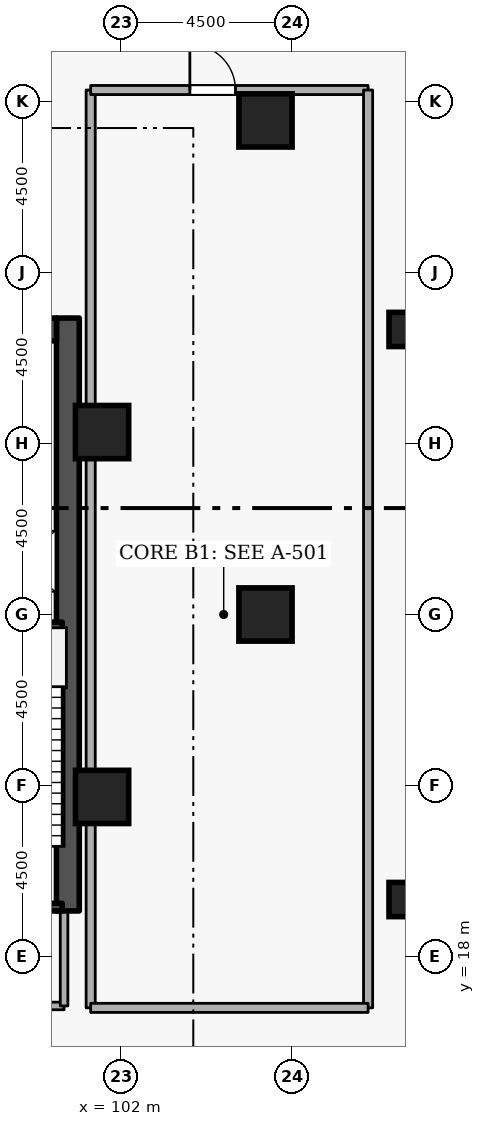
"""IFC4 building model, lengths in metres.
Left out: names, types, materials, properties, quantities, classifications, styles, units other than length and angle.
Written with IfcOpenShell. Run it as: python <this file> out.ifc"""

import sys

from ifc_helpers import new_model, si_unit, direction, frame, frame_2d, origin, origin_2d, place, context, subcontext, project, spatial, rectangle, extrude, element, fill, save


model = new_model("IFC4")
c1 = context("Model", 3, precision=1e-05, world=origin(), true_north=direction((0.0, 1.0)))
c2 = subcontext(c1, "Body", "Model", "MODEL_VIEW")
j1 = project(units=[si_unit("LENGTHUNIT", "METRE"), si_unit("PLANEANGLEUNIT", "RADIAN")], contexts=[c1])
p1 = place(None, origin())
s1 = spatial("IfcSite", under=j1, at=p1, CompositionType="ELEMENT")
p2 = place(p1, origin())
s2 = spatial("IfcBuilding", under=s1, at=p2, CompositionType="ELEMENT")
p3 = place(p2, frame((0.0, 0.0, -5.4)))
s3 = spatial("IfcBuildingStorey", under=s2, at=p3, CompositionType="ELEMENT", Elevation=-5.4)
p4 = place(p3, frame((100.6, 19.2, -0.6), z_axis=(0.0, 0.0, 1.0), x_axis=(0.0, 1.0, 0.0)))
e1 = element("IfcWall", 1, at=p4, inside=s3, PredefinedType="SHEAR", context=c2, shape_type="SweptSolid", body=[
    extrude(rectangle(XDim=15.6, YDim=0.6, at=frame_2d((7.8, 0.0))), origin(), (0.0, 0.0, 1.0), 6.0),
])
p5 = place(p3, frame((94.6, 34.5, -0.6), z_axis=(0.0, 0.0, 1.0), x_axis=(1.0, 0.0, 0.0)))
e2 = element("IfcWall", 2, at=p5, inside=s3, PredefinedType="SHEAR", context=c2, shape_type="SweptSolid", body=[
    extrude(rectangle(XDim=5.7, YDim=0.6, at=frame_2d((2.85, 0.0))), origin(), (0.0, 0.0, 1.0), 6.0),
])
for number, where, z_axis, x_axis in (
    (3, (105.8, 27.0, -0.6), (0.0, 0.0, 1.0), (1.0, 0.0, 0.0)),
    (4, (105.8, 40.0, -0.6), (0.0, 0.0, 1.0), (1.0, 0.0, 0.0)),
    (5, (101.5, 22.2, -0.6), (0.0, 0.0, 1.0), (1.0, 0.0, 0.0)),
    (6, (101.5, 31.8, -0.6), (0.0, 0.0, 1.0), (1.0, 0.0, 0.0)),
):
    element("IfcColumn", number, at=place(p3, frame(where, z_axis=z_axis, x_axis=x_axis)), inside=s3, PredefinedType="COLUMN", context=c2, shape_type="SweptSolid", body=[
        extrude(rectangle(XDim=1.4, YDim=1.4, at=origin_2d()), origin(), (0.0, 0.0, 1.0), 6.0),
    ])
for number, where, z_axis, x_axis in (
    (7, (109.5, 19.5, -0.6), (0.0, 0.0, 1.0), (1.0, 0.0, 0.0)),
    (8, (109.5, 34.5, -0.6), (0.0, 0.0, 1.0), (1.0, 0.0, 0.0)),
):
    element("IfcColumn", number, at=place(p3, frame(where, z_axis=z_axis, x_axis=x_axis)), inside=s3, PredefinedType="COLUMN", context=c2, shape_type="SweptSolid", body=[
        extrude(rectangle(XDim=0.9, YDim=0.9, at=origin_2d()), origin(), (0.0, 0.0, 1.0), 6.0),
    ])
p6 = place(p3, frame((100.45, 19.3, -0.6), z_axis=(0.0, 0.0, 1.0), x_axis=(-1.0, 0.0, 0.0)))
e9 = element("IfcWall", 9, at=p6, inside=s3, PredefinedType="SHEAR", context=c2, shape_type="SweptSolid", body=[
    extrude(rectangle(XDim=3.35, YDim=0.2, at=frame_2d((1.675, 0.0))), origin(), (0.0, 0.0, 1.0), 6.0),
])
p7 = place(p6, frame((1.125, 0.0, 0.6)))
e10 = element("IfcOpeningElement", 10, at=p7, cuts=e9, PredefinedType="OPENING", context=c2, shape_type="SweptSolid", body=[
    extrude(rectangle(XDim=1.1, YDim=2.1, at=frame_2d((0.55, 1.05))), frame((0.0, 0.11, 0.0), z_axis=(0.0, -1.0, 0.0), x_axis=(1.0, 0.0, 0.0)), (0.0, 0.0, 1.0), 0.22),
])
p8 = place(p3, frame((97.1, 26.7, -0.6), z_axis=(0.0, 0.0, 1.0), x_axis=(1.0, 0.0, 0.0)))
e11 = element("IfcWall", 11, at=p8, inside=s3, PredefinedType="SHEAR", context=c2, shape_type="SweptSolid", body=[
    extrude(rectangle(XDim=3.35, YDim=0.2, at=frame_2d((1.675, 0.0))), origin(), (0.0, 0.0, 1.0), 6.0),
])
p9 = place(p3, frame((95.35, 16.7, 0.0), z_axis=(0.0, 0.0, 1.0), x_axis=(1.0, 0.0, 0.0)))
e12 = element("IfcWall", 12, at=p9, inside=s3, PredefinedType="STANDARD", context=c2, shape_type="SweptSolid", body=[
    extrude(rectangle(XDim=5.15, YDim=0.2, at=frame_2d((2.575, 0.0))), origin(), (0.0, 0.0, 1.0), 5.06),
])
p10 = place(p9, frame((2.0, 0.0, 0.0)))
e13 = element("IfcOpeningElement", 13, at=p10, cuts=e12, PredefinedType="OPENING", context=c2, shape_type="SweptSolid", body=[
    extrude(rectangle(XDim=1.15, YDim=2.1, at=frame_2d((0.575, 1.05))), frame((0.0, 0.11, 0.0), z_axis=(0.0, -1.0, 0.0), x_axis=(1.0, 0.0, 0.0)), (0.0, 0.0, 1.0), 0.22),
])
p11 = place(p3, frame((100.5, 16.7, 0.0), z_axis=(0.0, 0.0, 1.0), x_axis=(0.0, 1.0, 0.0)))
e14 = element("IfcWall", 14, at=p11, inside=s3, PredefinedType="STANDARD", context=c2, shape_type="SweptSolid", body=[
    extrude(rectangle(XDim=2.5, YDim=0.2, at=frame_2d((1.25, 0.0))), origin(), (0.0, 0.0, 1.0), 5.06),
])
p12 = place(p3, frame((101.2, 16.65, 0.0), z_axis=(0.0, 0.0, 1.0), x_axis=(0.0, 1.0, 0.0)))
e15 = element("IfcWall", 15, at=p12, inside=s3, PredefinedType="STANDARD", context=c2, shape_type="SweptSolid", body=[
    extrude(rectangle(XDim=24.15, YDim=0.24, at=frame_2d((12.075, 0.0))), origin(), (0.0, 0.0, 1.0), 5.06),
])
p13 = place(p3, frame((101.2, 40.8, 0.0), z_axis=(0.0, 0.0, 1.0), x_axis=(1.0, 0.0, 0.0)))
e16 = element("IfcWall", 16, at=p13, inside=s3, PredefinedType="STANDARD", context=c2, shape_type="SweptSolid", body=[
    extrude(rectangle(XDim=7.3, YDim=0.24, at=frame_2d((3.65, 0.0))), origin(), (0.0, 0.0, 1.0), 5.06),
])
p14 = place(p13, frame((2.61, 0.0, 0.0)))
e17 = element("IfcOpeningElement", 17, at=p14, cuts=e16, PredefinedType="OPENING", context=c2, shape_type="SweptSolid", body=[
    extrude(rectangle(XDim=1.2, YDim=2.1, at=frame_2d((0.6, 1.05))), frame((0.0, 0.13, 0.0), z_axis=(0.0, -1.0, 0.0), x_axis=(1.0, 0.0, 0.0)), (0.0, 0.0, 1.0), 0.26),
])
p15 = place(p3, frame((108.5, 40.8, 0.0), z_axis=(0.0, 0.0, 1.0), x_axis=(0.0, -1.0, 0.0)))
e18 = element("IfcWall", 18, at=p15, inside=s3, PredefinedType="STANDARD", context=c2, shape_type="SweptSolid", body=[
    extrude(rectangle(XDim=24.15, YDim=0.24, at=frame_2d((12.075, 0.0))), origin(), (0.0, 0.0, 1.0), 5.06),
])
p16 = place(p3, frame((108.5, 16.65, 0.0), z_axis=(0.0, 0.0, 1.0), x_axis=(-1.0, 0.0, 0.0)))
e19 = element("IfcWall", 19, at=p16, inside=s3, PredefinedType="STANDARD", context=c2, shape_type="SweptSolid", body=[
    extrude(rectangle(XDim=7.3, YDim=0.24, at=frame_2d((3.65, 0.0))), origin(), (0.0, 0.0, 1.0), 5.06),
])
p17 = place(p14, origin())
e20 = element("IfcDoor", 20, at=p17, inside=s3, OperationType="SINGLE_SWING_LEFT", PredefinedType="DOOR", context=c2, shape_type="SweptSolid", body=[
    extrude(rectangle(XDim=1.2, YDim=2.1, at=frame_2d((0.6, 1.05))), frame((0.0, 0.025, 0.0), z_axis=(0.0, -1.0, 0.0), x_axis=(1.0, 0.0, 0.0)), (0.0, 0.0, 1.0), 0.05),
])
fill(e17, e20)
save(model, sys.argv[1])
